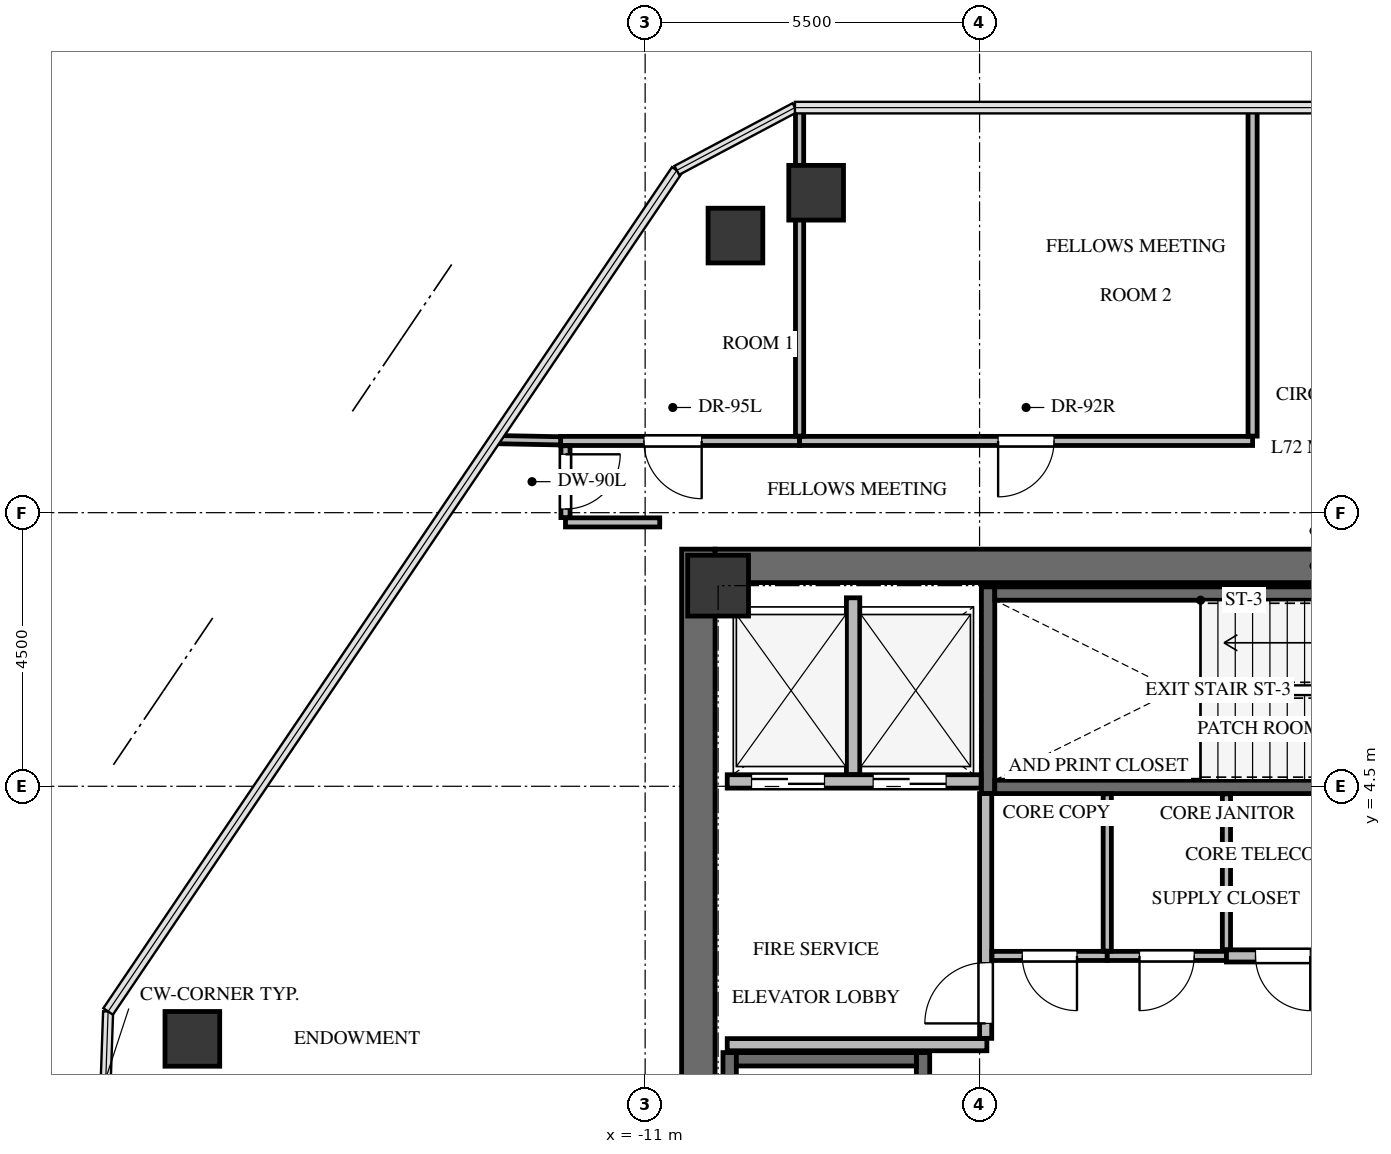
"""IFC4 building model, lengths in metres.
Left out: names, types, materials, properties, quantities, classifications, styles, units other than length and angle.
Written with IfcOpenShell. Run it as: python <this file> out.ifc"""

import sys

from ifc_helpers import new_model, si_unit, direction, frame, frame_2d, origin, origin_2d, place, context, subcontext, project, spatial, rectangle, extrude, source, transform, mapped, element, fill, save


model = new_model("IFC4")
c1 = context("Model", 3, precision=1e-05, world=origin(), true_north=direction((0.0, 1.0)))
c2 = subcontext(c1, "Body", "Model", "MODEL_VIEW")
j1 = project(units=[si_unit("LENGTHUNIT", "METRE"), si_unit("PLANEANGLEUNIT", "RADIAN")], contexts=[c1])
p1 = place(None, origin())
s1 = spatial("IfcSite", under=j1, at=p1, CompositionType="ELEMENT")
p2 = place(p1, origin())
s2 = spatial("IfcBuilding", under=s1, at=p2, CompositionType="ELEMENT")
p3 = place(p2, frame((0.0, 0.0, 258.1)))
s3 = spatial("IfcBuildingStorey", under=s2, at=p3, CompositionType="ELEMENT", Elevation=258.1)
p4 = place(p3, frame((-10.125, -8.4, 0.0), z_axis=(0.0, 0.0, 1.0), x_axis=(0.0, 1.0, 0.0)))
e1 = element("IfcWall", 1, at=p4, inside=s3, PredefinedType="SHEAR", context=c2, shape_type="SweptSolid", body=[
    extrude(rectangle(XDim=16.8, YDim=0.55, at=frame_2d((8.4, 0.0))), origin(), (0.0, 0.0, 1.0), 3.4),
])
p5 = place(p3, frame((-9.85, 8.125, 0.0), z_axis=(0.0, 0.0, 1.0), x_axis=(1.0, 0.0, 0.0)))
e2 = element("IfcWall", 2, at=p5, inside=s3, PredefinedType="SHEAR", context=c2, shape_type="SweptSolid", body=[
    extrude(rectangle(XDim=19.7, YDim=0.55, at=frame_2d((9.85, 0.0))), origin(), (0.0, 0.0, 1.0), 3.4),
])
p6 = place(p3, frame((-6.43, -7.77, -0.24), z_axis=(0.0, 0.0, 1.0), x_axis=(0.0, 1.0, 0.0)))
e3 = element("IfcWall", 3, at=p6, inside=s3, PredefinedType="SHEAR", context=c2, shape_type="SweptSolid", body=[
    extrude(rectangle(XDim=7.89, YDim=0.22, at=frame_2d((3.945, 0.0))), origin(), (0.0, 0.0, 1.0), 3.4),
])
p7 = place(p6, frame((6.32, 0.0, 0.0)))
e4 = element("IfcOpeningElement", 4, at=p7, cuts=e3, PredefinedType="OPENING", context=c2, shape_type="SweptSolid", body=[
    extrude(rectangle(XDim=1.05, YDim=2.15, at=frame_2d((0.525, 1.075))), frame((0.0, 0.12, 0.0), z_axis=(0.0, -1.0, 0.0), x_axis=(1.0, 0.0, 0.0)), (0.0, 0.0, 1.0), 0.24),
])
p8 = place(p3, frame((-9.61, 0.12, -0.24), z_axis=(0.0, 0.0, 1.0), x_axis=(0.0, -1.0, 0.0)))
e5 = element("IfcWall", 5, at=p8, inside=s3, PredefinedType="SHEAR", context=c2, shape_type="SweptSolid", body=[
    extrude(rectangle(XDim=7.89, YDim=0.22, at=frame_2d((3.945, 0.0))), origin(), (0.0, 0.0, 1.0), 3.4),
])
p9 = place(p3, frame((-6.54, 0.01, -0.24), z_axis=(0.0, 0.0, 1.0), x_axis=(-1.0, 0.0, 0.0)))
e6 = element("IfcWall", 6, at=p9, inside=s3, PredefinedType="SHEAR", context=c2, shape_type="SweptSolid", body=[
    extrude(rectangle(XDim=2.96, YDim=0.22, at=frame_2d((1.48, 0.0))), origin(), (0.0, 0.0, 1.0), 3.4),
])
p10 = place(p3, frame((-5.36, 7.78, -0.24), z_axis=(0.0, 0.0, 1.0), x_axis=(0.0, -1.0, 0.0)))
e7 = element("IfcWall", 7, at=p10, inside=s3, PredefinedType="SHEAR", context=c2, shape_type="SweptSolid", body=[
    extrude(rectangle(XDim=3.4, YDim=0.22, at=frame_2d((1.7, 0.0))), origin(), (0.0, 0.0, 1.0), 3.4),
])
p11 = place(p3, frame((-5.25, 4.49, -0.24), z_axis=(0.0, 0.0, 1.0), x_axis=(1.0, 0.0, 0.0)))
e8 = element("IfcWall", 8, at=p11, inside=s3, PredefinedType="SHEAR", context=c2, shape_type="SweptSolid", body=[
    extrude(rectangle(XDim=7.35, YDim=0.22, at=frame_2d((3.675, 0.0))), origin(), (0.0, 0.0, 1.0), 3.4),
])
p12 = place(p11, frame((5.85, 0.0, 0.0)))
e9 = element("IfcOpeningElement", 9, at=p12, cuts=e8, PredefinedType="OPENING", context=c2, shape_type="SweptSolid", body=[
    extrude(rectangle(XDim=1.05, YDim=2.15, at=frame_2d((0.525, 1.075))), frame((0.0, 0.12, 0.0), z_axis=(0.0, -1.0, 0.0), x_axis=(1.0, 0.0, 0.0)), (0.0, 0.0, 1.0), 0.24),
])
p13 = place(p3, frame((2.1, 7.67, -0.24), z_axis=(0.0, 0.0, 1.0), x_axis=(-1.0, 0.0, 0.0)))
e10 = element("IfcWall", 10, at=p13, inside=s3, PredefinedType="SHEAR", context=c2, shape_type="SweptSolid", body=[
    extrude(rectangle(XDim=7.35, YDim=0.22, at=frame_2d((3.675, 0.0))), origin(), (0.0, 0.0, 1.0), 3.4),
])
m1 = source(origin(), c2, "Body", "SweptSolid", [
    extrude(rectangle(XDim=1.0, YDim=1.0, at=origin_2d()), origin(), (0.0, 0.0, 1.0), 3.4),
])
p14 = place(p3, frame((-9.8, 7.8, -0.24), z_axis=(0.0, 0.0, 1.0), x_axis=(1.0, 0.0, 0.0)))
e11 = element("IfcColumn", 11, at=p14, inside=s3, PredefinedType="COLUMN", context=c2, shape_type="MappedRepresentation", body=[
    mapped(m1, transform((0.0, 0.0, 0.0), x_axis=(1.0, 0.0, 0.0), y_axis=(0.0, 1.0, 0.0), z_axis=(0.0, 0.0, 1.0), scale=1.0)),
])
m2 = source(origin(), c2, "Body", "SweptSolid", [
    extrude(rectangle(XDim=0.9, YDim=0.9, at=origin_2d()), origin(), (0.0, 0.0, 1.0), 3.4),
])
for number, where, z_axis, x_axis in (
    (12, (-18.446, 0.346, -0.24), (0.0, 0.0, 1.0), (1.0, 0.0, 0.0)),
    (13, (-9.515, 13.557, -0.24), (0.0, 0.0, 1.0), (1.0, 0.0, 0.0)),
    (14, (-8.188, 14.262, -0.24), (0.0, 0.0, 1.0), (1.0, 0.0, 0.0)),
):
    element("IfcColumn", number, at=place(p3, frame(where, z_axis=z_axis, x_axis=x_axis)), inside=s3, PredefinedType="COLUMN", context=c2, shape_type="MappedRepresentation", body=[
        mapped(m2, transform((0.0, 0.0, 0.0), x_axis=(1.0, 0.0, 0.0), y_axis=(0.0, 1.0, 0.0), z_axis=(0.0, 0.0, 1.0), scale=1.0)),
    ])
p15 = place(p3, frame((-9.65, 4.58, 0.0), z_axis=(0.0, 0.0, 1.0), x_axis=(1.0, 0.0, 0.0)))
e15 = element("IfcWall", 15, at=p15, inside=s3, PredefinedType="SOLIDWALL", context=c2, shape_type="SweptSolid", body=[
    extrude(rectangle(XDim=4.175, YDim=0.22, at=frame_2d((2.087, 0.0))), origin(), (0.0, 0.0, 1.0), 3.145),
])
p16 = place(p15, frame((0.4, 0.0, 0.0)))
e16 = element("IfcOpeningElement", 16, at=p16, cuts=e15, PredefinedType="OPENING", context=c2, shape_type="SweptSolid", body=[
    extrude(rectangle(XDim=1.2, YDim=2.15, at=frame_2d((0.6, 1.075))), frame((0.0, 0.12, 0.0), z_axis=(0.0, -1.0, 0.0), x_axis=(1.0, 0.0, 0.0)), (0.0, 0.0, 1.0), 0.24),
])
p17 = place(p15, frame((2.4, 0.0, 0.0)))
e17 = element("IfcOpeningElement", 17, at=p17, cuts=e15, PredefinedType="OPENING", context=c2, shape_type="SweptSolid", body=[
    extrude(rectangle(XDim=1.2, YDim=2.15, at=frame_2d((0.6, 1.075))), frame((0.0, 0.12, 0.0), z_axis=(0.0, -1.0, 0.0), x_axis=(1.0, 0.0, 0.0)), (0.0, 0.0, 1.0), 0.24),
])
p18 = place(p3, frame((-7.58, 4.694, 0.0), z_axis=(0.0, 0.0, 1.0), x_axis=(0.0, 1.0, 0.0)))
e18 = element("IfcWall", 18, at=p18, inside=s3, PredefinedType="SOLIDWALL", context=c2, shape_type="SweptSolid", body=[
    extrude(rectangle(XDim=2.906, YDim=0.22, at=frame_2d((1.453, 0.0))), origin(), (0.0, 0.0, 1.0), 3.145),
])
p19 = place(p3, frame((-9.65, 0.25, 0.0), z_axis=(0.0, 0.0, 1.0), x_axis=(1.0, 0.0, 0.0)))
e19 = element("IfcWall", 19, at=p19, inside=s3, PredefinedType="SOLIDWALL", context=c2, shape_type="SweptSolid", body=[
    extrude(rectangle(XDim=4.27, YDim=0.2, at=frame_2d((2.135, 0.0))), origin(), (0.0, 0.0, 1.0), 3.145),
])
p20 = place(p3, frame((-5.4, 0.354, 0.0), z_axis=(0.0, 0.0, 1.0), x_axis=(0.0, 1.0, 0.0)))
e20 = element("IfcWall", 20, at=p20, inside=s3, PredefinedType="SOLIDWALL", context=c2, shape_type="SweptSolid", body=[
    extrude(rectangle(XDim=4.026, YDim=0.2, at=frame_2d((2.013, 0.0))), origin(), (0.0, 0.0, 1.0), 3.145),
])
p21 = place(p20, frame((0.246, 0.0, 0.0)))
e21 = element("IfcOpeningElement", 21, at=p21, cuts=e20, PredefinedType="OPENING", context=c2, shape_type="SweptSolid", body=[
    extrude(rectangle(XDim=1.0, YDim=2.15, at=frame_2d((0.5, 1.075))), frame((0.0, 0.11, 0.0), z_axis=(0.0, -1.0, 0.0), x_axis=(1.0, 0.0, 0.0)), (0.0, 0.0, 1.0), 0.22),
])
p22 = place(p3, frame((-3.4, 1.71, 0.0), z_axis=(0.0, 0.0, 1.0), x_axis=(-1.0, 0.0, 0.0)))
e22 = element("IfcWall", 22, at=p22, inside=s3, PredefinedType="PARTITIONING", context=c2, shape_type="SweptSolid", body=[
    extrude(rectangle(XDim=1.896, YDim=0.15, at=frame_2d((0.948, 0.0))), origin(), (0.0, 0.0, 1.0), 3.145),
])
p23 = place(p22, frame((0.498, 0.0, 0.0)))
e23 = element("IfcOpeningElement", 23, at=p23, cuts=e22, PredefinedType="OPENING", context=c2, shape_type="SweptSolid", body=[
    extrude(rectangle(XDim=0.9, YDim=2.05, at=frame_2d((0.45, 1.025))), frame((0.0, 0.085, 0.0), z_axis=(0.0, -1.0, 0.0), x_axis=(1.0, 0.0, 0.0)), (0.0, 0.0, 1.0), 0.17),
])
p24 = place(p3, frame((-1.44, 1.71, 0.0), z_axis=(0.0, 0.0, 1.0), x_axis=(-1.0, 0.0, 0.0)))
e24 = element("IfcWall", 24, at=p24, inside=s3, PredefinedType="PARTITIONING", context=c2, shape_type="SweptSolid", body=[
    extrude(rectangle(XDim=1.96, YDim=0.15, at=frame_2d((0.98, 0.0))), origin(), (0.0, 0.0, 1.0), 3.145),
])
p25 = place(p24, frame((0.53, 0.0, 0.0)))
e25 = element("IfcOpeningElement", 25, at=p25, cuts=e24, PredefinedType="OPENING", context=c2, shape_type="SweptSolid", body=[
    extrude(rectangle(XDim=0.9, YDim=2.05, at=frame_2d((0.45, 1.025))), frame((0.0, 0.085, 0.0), z_axis=(0.0, -1.0, 0.0), x_axis=(1.0, 0.0, 0.0)), (0.0, 0.0, 1.0), 0.17),
])
p26 = place(p3, frame((0.416, 1.71, 0.0), z_axis=(0.0, 0.0, 1.0), x_axis=(-1.0, 0.0, 0.0)))
e26 = element("IfcWall", 26, at=p26, inside=s3, PredefinedType="SOLIDWALL", context=c2, shape_type="SweptSolid", body=[
    extrude(rectangle(XDim=1.856, YDim=0.2, at=frame_2d((0.928, 0.0))), origin(), (0.0, 0.0, 1.0), 3.145),
])
p27 = place(p26, frame((0.478, 0.0, 0.0)))
e27 = element("IfcOpeningElement", 27, at=p27, cuts=e26, PredefinedType="OPENING", context=c2, shape_type="SweptSolid", body=[
    extrude(rectangle(XDim=0.9, YDim=2.05, at=frame_2d((0.45, 1.025))), frame((0.0, 0.11, 0.0), z_axis=(0.0, -1.0, 0.0), x_axis=(1.0, 0.0, 0.0)), (0.0, 0.0, 1.0), 0.22),
])
p28 = place(p3, frame((-8.46, 10.18, 0.0), z_axis=(0.0, 0.0, 1.0), x_axis=(-1.0, 0.0, 0.0)))
e28 = element("IfcWall", 28, at=p28, inside=s3, PredefinedType="PARTITIONING", context=c2, shape_type="SweptSolid", body=[
    extrude(rectangle(XDim=3.93, YDim=0.15, at=frame_2d((1.965, 0.0))), origin(), (0.0, 0.0, 1.0), 2.401),
])
p29 = place(p28, frame((1.61, 0.0, 0.0)))
e29 = element("IfcOpeningElement", 29, at=p29, cuts=e28, PredefinedType="OPENING", context=c2, shape_type="SweptSolid", body=[
    extrude(rectangle(XDim=0.95, YDim=2.1, at=frame_2d((0.475, 1.05))), frame((0.0, 0.085, 0.0), z_axis=(0.0, -1.0, 0.0), x_axis=(1.0, 0.0, 0.0)), (0.0, 0.0, 1.0), 0.17),
])
p30 = place(p3, frame((-1.01, 10.18, 0.0), z_axis=(0.0, 0.0, 1.0), x_axis=(-1.0, 0.0, 0.0)))
e30 = element("IfcWall", 30, at=p30, inside=s3, PredefinedType="PARTITIONING", context=c2, shape_type="SweptSolid", body=[
    extrude(rectangle(XDim=7.45, YDim=0.15, at=frame_2d((3.725, 0.0))), origin(), (0.0, 0.0, 1.0), 2.401),
])
p31 = place(p30, frame((3.265, 0.0, 0.0)))
e31 = element("IfcOpeningElement", 31, at=p31, cuts=e30, PredefinedType="OPENING", context=c2, shape_type="SweptSolid", body=[
    extrude(rectangle(XDim=0.92, YDim=2.1, at=frame_2d((0.46, 1.05))), frame((0.0, 0.085, 0.0), z_axis=(0.0, -1.0, 0.0), x_axis=(1.0, 0.0, 0.0)), (0.0, 0.0, 1.0), 0.17),
])
p32 = place(p3, frame((-1.01, 15.662, 0.0), z_axis=(0.0, 0.0, 1.0), x_axis=(0.0, -1.0, 0.0)))
e32 = element("IfcWall", 32, at=p32, inside=s3, PredefinedType="PARTITIONING", context=c2, shape_type="SweptSolid", body=[
    extrude(rectangle(XDim=5.403, YDim=0.15, at=frame_2d((2.702, 0.0))), origin(), (0.0, 0.0, 1.0), 2.499),
])
p33 = place(p3, frame((-12.31, 8.84, 0.0), z_axis=(0.0, 0.0, 1.0), x_axis=(1.0, 0.0, 0.0)))
e33 = element("IfcWall", 33, at=p33, inside=s3, PredefinedType="PARTITIONING", context=c2, shape_type="SweptSolid", body=[
    extrude(rectangle(XDim=1.55, YDim=0.15, at=frame_2d((0.775, 0.0))), origin(), (0.0, 0.0, 1.0), 3.145),
])
p34 = place(p3, frame((-12.31, 10.101, 0.0), z_axis=(0.0, 0.0, 1.0), x_axis=(0.0, -1.0, 0.0)))
e34 = element("IfcWall", 34, at=p34, inside=s3, PredefinedType="PARTITIONING", context=c2, shape_type="SweptSolid", body=[
    extrude(rectangle(XDim=1.182, YDim=0.15, at=frame_2d((0.591, 0.0))), origin(), (0.0, 0.0, 1.0), 2.499),
])
p35 = place(p34, frame((0.141, 0.0, 0.0)))
e35 = element("IfcOpeningElement", 35, at=p35, cuts=e34, PredefinedType="OPENING", context=c2, shape_type="SweptSolid", body=[
    extrude(rectangle(XDim=0.9, YDim=2.05, at=frame_2d((0.45, 1.025))), frame((0.0, 0.085, 0.0), z_axis=(0.0, -1.0, 0.0), x_axis=(1.0, 0.0, 0.0)), (0.0, 0.0, 1.0), 0.17),
])
p36 = place(p3, frame((-3.4, 4.375, 0.0), z_axis=(0.0, 0.0, 1.0), x_axis=(0.0, -1.0, 0.0)))
e36 = element("IfcWall", 36, at=p36, inside=s3, PredefinedType="PARTITIONING", context=c2, shape_type="SweptSolid", body=[
    extrude(rectangle(XDim=2.586, YDim=0.135, at=frame_2d((1.293, 0.0))), origin(), (0.0, 0.0, 1.0), 3.145),
])
p37 = place(p3, frame((-1.44, 4.375, 0.0), z_axis=(0.0, 0.0, 1.0), x_axis=(0.0, -1.0, 0.0)))
e37 = element("IfcWall", 37, at=p37, inside=s3, PredefinedType="PARTITIONING", context=c2, shape_type="SweptSolid", body=[
    extrude(rectangle(XDim=2.561, YDim=0.135, at=frame_2d((1.281, 0.0))), origin(), (0.0, 0.0, 1.0), 3.145),
])
p38 = place(p3, frame((-8.46, 14.361, 0.0), z_axis=(0.0, 0.0, 1.0), x_axis=(0.0, -1.0, 0.0)))
e38 = element("IfcWall", 38, at=p38, inside=s3, PredefinedType="PARTITIONING", context=c2, shape_type="SweptSolid", body=[
    extrude(rectangle(XDim=4.102, YDim=0.135, at=frame_2d((2.051, 0.0))), origin(), (0.0, 0.0, 1.0), 2.401),
])
p39 = place(p3, frame((-8.46, 15.662, 0.0), z_axis=(0.0, 0.0, 1.0), x_axis=(0.0, -1.0, 0.0)))
e39 = element("IfcWall", 39, at=p39, inside=s3, PredefinedType="PARTITIONING", context=c2, shape_type="SweptSolid", body=[
    extrude(rectangle(XDim=1.301, YDim=0.135, at=frame_2d((0.65, 0.0))), origin(), (0.0, 0.0, 1.0), 1.977),
])
p40 = place(p3, frame((-12.39, 10.181, 0.0), z_axis=(0.0, 0.0, 1.0), x_axis=(-0.999812128272, 0.019383192748, 0.0)))
e40 = element("IfcWall", 40, at=p40, inside=s3, PredefinedType="PARTITIONING", context=c2, shape_type="SweptSolid", body=[
    extrude(rectangle(XDim=1.083, YDim=0.135, at=frame_2d((0.542, 0.0))), origin(), (0.0, 0.0, 1.0), 3.145),
])
m3 = source(origin(), c2, "Body", "SweptSolid", [
    extrude(rectangle(XDim=1.2, YDim=2.15, at=frame_2d((0.6, 1.075))), frame((0.0, 0.025, 0.0), z_axis=(0.0, -1.0, 0.0), x_axis=(1.0, 0.0, 0.0)), (0.0, 0.0, 1.0), 0.05),
])
p41 = place(p16, origin())
e41 = element("IfcDoor", 41, at=p41, inside=s3, OperationType="DOUBLE_DOOR_SLIDING", PredefinedType="DOOR", context=c2, shape_type="MappedRepresentation", body=[
    mapped(m3, transform((0.0, 0.0, 0.0), x_axis=(1.0, 0.0, 0.0), y_axis=(0.0, 1.0, 0.0), z_axis=(0.0, 0.0, 1.0), scale=1.0)),
])
fill(e16, e41)
p42 = place(p17, origin())
e42 = element("IfcDoor", 42, at=p42, inside=s3, OperationType="DOUBLE_DOOR_SLIDING", PredefinedType="DOOR", context=c2, shape_type="MappedRepresentation", body=[
    mapped(m3, transform((0.0, 0.0, 0.0), x_axis=(1.0, 0.0, 0.0), y_axis=(0.0, 1.0, 0.0), z_axis=(0.0, 0.0, 1.0), scale=1.0)),
])
fill(e17, e42)
m4 = source(origin(), c2, "Body", "SweptSolid", [
    extrude(rectangle(XDim=1.0, YDim=2.15, at=frame_2d((0.5, 1.075))), frame((0.0, 0.025, 0.0), z_axis=(0.0, -1.0, 0.0), x_axis=(1.0, 0.0, 0.0)), (0.0, 0.0, 1.0), 0.05),
])
p43 = place(p21, origin())
e43 = element("IfcDoor", 43, at=p43, inside=s3, OperationType="SINGLE_SWING_LEFT", PredefinedType="DOOR", context=c2, shape_type="MappedRepresentation", body=[
    mapped(m4, transform((0.0, 0.0, 0.0), x_axis=(1.0, 0.0, 0.0), y_axis=(0.0, 1.0, 0.0), z_axis=(0.0, 0.0, 1.0), scale=1.0)),
])
fill(e21, e43)
m5 = source(origin(), c2, "Body", "SweptSolid", [
    extrude(rectangle(XDim=0.9, YDim=2.05, at=frame_2d((0.45, 1.025))), frame((0.0, 0.025, 0.0), z_axis=(0.0, -1.0, 0.0), x_axis=(1.0, 0.0, 0.0)), (0.0, 0.0, 1.0), 0.05),
])
p44 = place(p23, origin())
e44 = element("IfcDoor", 44, at=p44, inside=s3, OperationType="SINGLE_SWING_LEFT", PredefinedType="DOOR", context=c2, shape_type="MappedRepresentation", body=[
    mapped(m5, transform((0.0, 0.0, 0.0), x_axis=(1.0, 0.0, 0.0), y_axis=(0.0, 1.0, 0.0), z_axis=(0.0, 0.0, 1.0), scale=1.0)),
])
fill(e23, e44)
m6 = source(origin(), c2, "Body", "SweptSolid", [
    extrude(rectangle(XDim=0.9, YDim=2.05, at=frame_2d((0.45, 1.025))), frame((0.0, 0.025, 0.0), z_axis=(0.0, -1.0, 0.0), x_axis=(1.0, 0.0, 0.0)), (0.0, 0.0, 1.0), 0.05),
])
p45 = place(p25, origin())
e45 = element("IfcDoor", 45, at=p45, inside=s3, OperationType="SINGLE_SWING_RIGHT", PredefinedType="DOOR", context=c2, shape_type="MappedRepresentation", body=[
    mapped(m6, transform((0.0, 0.0, 0.0), x_axis=(1.0, 0.0, 0.0), y_axis=(0.0, 1.0, 0.0), z_axis=(0.0, 0.0, 1.0), scale=1.0)),
])
fill(e25, e45)
p46 = place(p27, origin())
e46 = element("IfcDoor", 46, at=p46, inside=s3, OperationType="SINGLE_SWING_LEFT", PredefinedType="DOOR", context=c2, shape_type="MappedRepresentation", body=[
    mapped(m5, transform((0.0, 0.0, 0.0), x_axis=(1.0, 0.0, 0.0), y_axis=(0.0, 1.0, 0.0), z_axis=(0.0, 0.0, 1.0), scale=1.0)),
])
fill(e27, e46)
m7 = source(origin(), c2, "Body", "SweptSolid", [
    extrude(rectangle(XDim=0.95, YDim=2.1, at=frame_2d((0.475, 1.05))), frame((0.0, 0.025, 0.0), z_axis=(0.0, -1.0, 0.0), x_axis=(1.0, 0.0, 0.0)), (0.0, 0.0, 1.0), 0.05),
])
p47 = place(p29, origin())
e47 = element("IfcDoor", 47, at=p47, inside=s3, OperationType="SINGLE_SWING_LEFT", PredefinedType="DOOR", context=c2, shape_type="MappedRepresentation", body=[
    mapped(m7, transform((0.0, 0.0, 0.0), x_axis=(1.0, 0.0, 0.0), y_axis=(0.0, 1.0, 0.0), z_axis=(0.0, 0.0, 1.0), scale=1.0)),
])
fill(e29, e47)
m8 = source(origin(), c2, "Body", "SweptSolid", [
    extrude(rectangle(XDim=0.92, YDim=2.1, at=frame_2d((0.46, 1.05))), frame((0.0, 0.025, 0.0), z_axis=(0.0, -1.0, 0.0), x_axis=(1.0, 0.0, 0.0)), (0.0, 0.0, 1.0), 0.05),
])
p48 = place(p31, origin())
e48 = element("IfcDoor", 48, at=p48, inside=s3, OperationType="SINGLE_SWING_RIGHT", PredefinedType="DOOR", context=c2, shape_type="MappedRepresentation", body=[
    mapped(m8, transform((0.0, 0.0, 0.0), x_axis=(1.0, 0.0, 0.0), y_axis=(0.0, 1.0, 0.0), z_axis=(0.0, 0.0, 1.0), scale=1.0)),
])
fill(e31, e48)
m9 = source(origin(), c2, "Body", "SweptSolid", [
    extrude(rectangle(XDim=0.9, YDim=2.05, at=frame_2d((0.45, 1.025))), frame((0.0, 0.025, 0.0), z_axis=(0.0, -1.0, 0.0), x_axis=(1.0, 0.0, 0.0)), (0.0, 0.0, 1.0), 0.05),
])
p49 = place(p35, origin())
e49 = element("IfcDoor", 49, at=p49, inside=s3, OperationType="SINGLE_SWING_LEFT", PredefinedType="DOOR", context=c2, shape_type="MappedRepresentation", body=[
    mapped(m9, transform((0.0, 0.0, 0.0), x_axis=(1.0, 0.0, 0.0), y_axis=(0.0, 1.0, 0.0), z_axis=(0.0, 0.0, 1.0), scale=1.0)),
])
fill(e35, e49)
save(model, sys.argv[1])
